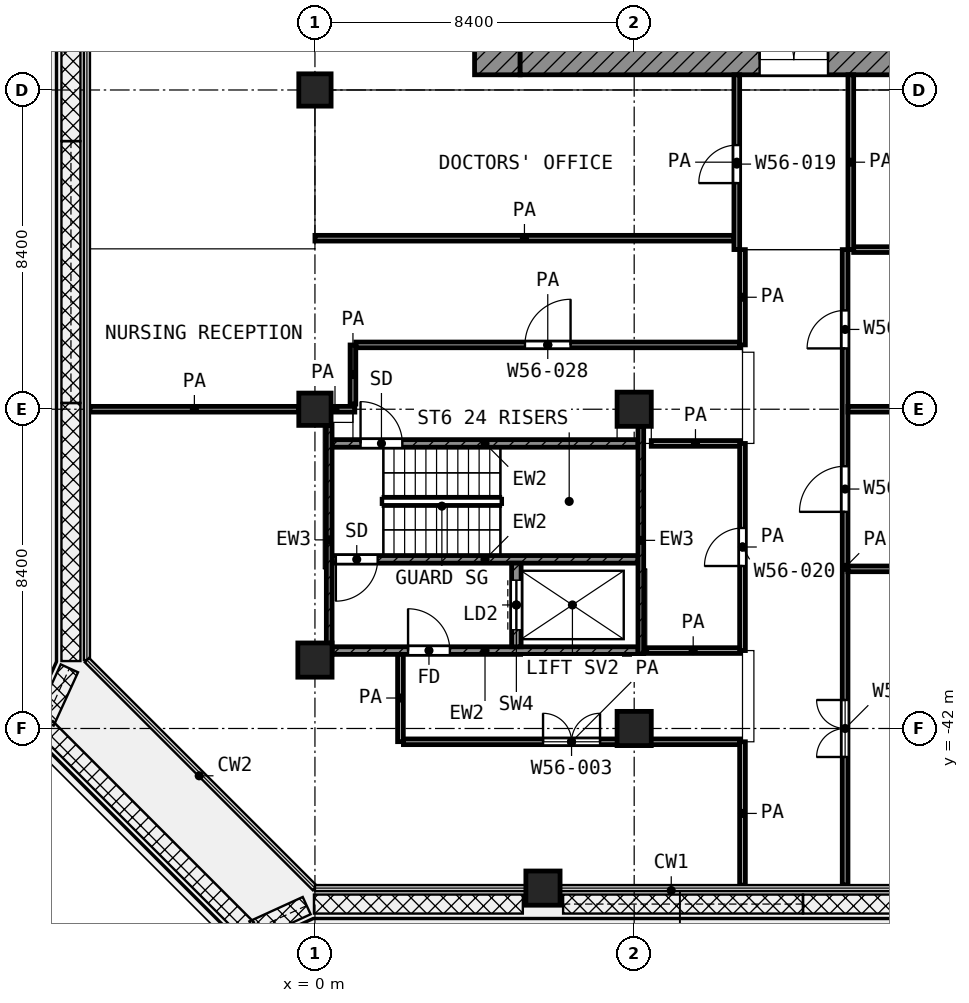
"""IFC4 building model, lengths in metres.
Left out: names, types, materials, properties, quantities, classifications, styles, units other than length and angle.
Written with IfcOpenShell. Run it as: python <this file> out.ifc"""

import sys

from ifc_helpers import new_model, si_unit, direction, frame, frame_2d, origin, origin_2d, place, context, subcontext, project, spatial, rectangle, extrude, element, fill, save


model = new_model("IFC4")
c1 = context("Model", 3, precision=1e-05, world=origin(), true_north=direction((0.0, 1.0)))
c2 = subcontext(c1, "Body", "Model", "MODEL_VIEW")
j1 = project(units=[si_unit("LENGTHUNIT", "METRE"), si_unit("PLANEANGLEUNIT", "RADIAN")], contexts=[c1])
p1 = place(None, origin())
s1 = spatial("IfcSite", under=j1, at=p1, CompositionType="ELEMENT")
p2 = place(p1, origin())
s2 = spatial("IfcBuilding", under=s1, at=p2, CompositionType="ELEMENT")
p3 = place(p2, frame((0.0, 0.0, 243.2)))
s3 = spatial("IfcBuildingStorey", under=s2, at=p3, CompositionType="ELEMENT", Elevation=243.2)
for number, where, z_axis, x_axis in (
    (1, (0.0, -25.2, 0.0), (0.0, 0.0, 1.0), (1.0, 0.0, 0.0)),
    (2, (0.0, -33.6, 0.0), (0.0, 0.0, 1.0), (1.0, 0.0, 0.0)),
):
    element("IfcColumn", number, at=place(p3, frame(where, z_axis=z_axis, x_axis=x_axis)), inside=s3, PredefinedType="COLUMN", context=c2, shape_type="SweptSolid", body=[
        extrude(rectangle(XDim=0.85, YDim=0.85, at=origin_2d()), origin(), (0.0, 0.0, 1.0), 4.2),
    ])
for number, where, z_axis, x_axis in (
    (3, (8.4, -33.6, 0.0), (0.0, 0.0, 1.0), (1.0, 0.0, 0.0)),
    (4, (0.0, -40.2, 0.0), (0.0, 0.0, 1.0), (1.0, 0.0, 0.0)),
    (5, (8.4, -42.0, 0.0), (0.0, 0.0, 1.0), (1.0, 0.0, 0.0)),
    (6, (6.0, -46.2, 0.0), (0.0, 0.0, 1.0), (1.0, 0.0, 0.0)),
):
    element("IfcColumn", number, at=place(p3, frame(where, z_axis=z_axis, x_axis=x_axis)), inside=s3, PredefinedType="COLUMN", context=c2, shape_type="SweptSolid", body=[
        extrude(rectangle(XDim=0.9, YDim=0.9, at=origin_2d()), origin(), (0.0, 0.0, 1.0), 4.2),
    ])
p4 = place(p3, frame((4.8, -24.8, 0.0), z_axis=(0.0, 0.0, 1.0), x_axis=(0.0, 1.0, 0.0)))
e7 = element("IfcWall", 7, at=p4, inside=s3, PredefinedType="SHEAR", context=c2, shape_type="SweptSolid", body=[
    extrude(rectangle(XDim=19.4, YDim=1.2, at=frame_2d((9.7, 0.0))), origin(), (0.0, 0.0, 1.0), 3.6),
])
p5 = place(p4, frame((11.25, 0.0, 0.0)))
e8 = element("IfcOpeningElement", 8, at=p5, cuts=e7, PredefinedType="OPENING", context=c2, shape_type="SweptSolid", body=[
    extrude(rectangle(XDim=1.1, YDim=2.1, at=frame_2d((0.55, 1.05))), frame((0.0, 0.61, 0.0), z_axis=(0.0, -1.0, 0.0), x_axis=(1.0, 0.0, 0.0)), (0.0, 0.0, 1.0), 1.22),
])
p6 = place(p4, frame((1.95, 0.0, 0.0)))
e9 = element("IfcOpeningElement", 9, at=p6, cuts=e7, PredefinedType="OPENING", context=c2, shape_type="SweptSolid", body=[
    extrude(rectangle(XDim=1.1, YDim=2.1, at=frame_2d((0.55, 1.05))), frame((0.0, 0.61, 0.0), z_axis=(0.0, -1.0, 0.0), x_axis=(1.0, 0.0, 0.0)), (0.0, 0.0, 1.0), 1.22),
])
p7 = place(p3, frame((5.4, -24.4, 0.0), z_axis=(0.0, 0.0, 1.0), x_axis=(1.0, 0.0, 0.0)))
e10 = element("IfcWall", 10, at=p7, inside=s3, PredefinedType="SHEAR", context=c2, shape_type="SweptSolid", body=[
    extrude(rectangle(XDim=18.6, YDim=0.8, at=frame_2d((9.3, 0.0))), origin(), (0.0, 0.0, 1.0), 3.6),
])
p8 = place(p7, frame((6.3, 0.0, 0.0)))
e11 = element("IfcOpeningElement", 11, at=p8, cuts=e10, PredefinedType="OPENING", context=c2, shape_type="SweptSolid", body=[
    extrude(rectangle(XDim=1.8, YDim=2.1, at=frame_2d((0.9, 1.05))), frame((0.0, 0.41, 0.0), z_axis=(0.0, -1.0, 0.0), x_axis=(1.0, 0.0, 0.0)), (0.0, 0.0, 1.0), 0.82),
])
p9 = place(p3, frame((0.375, -40.05, 0.0), z_axis=(0.0, 0.0, 1.0), x_axis=(0.0, 1.0, 0.0)))
e12 = element("IfcWall", 12, at=p9, inside=s3, PredefinedType="SHEAR", context=c2, shape_type="SweptSolid", body=[
    extrude(rectangle(XDim=6.025, YDim=0.15, at=frame_2d((3.013, 0.0))), origin(), (0.0, 0.0, 1.0), 3.6),
])
p10 = place(p3, frame((8.575, -40.05, 0.0), z_axis=(0.0, 0.0, 1.0), x_axis=(0.0, 1.0, 0.0)))
e13 = element("IfcWall", 13, at=p10, inside=s3, PredefinedType="SHEAR", context=c2, shape_type="SweptSolid", body=[
    extrude(rectangle(XDim=6.0, YDim=0.15, at=frame_2d((3.0, 0.0))), origin(), (0.0, 0.0, 1.0), 3.6),
])
p11 = place(p3, frame((0.45, -34.5, 0.0), z_axis=(0.0, 0.0, 1.0), x_axis=(1.0, 0.0, 0.0)))
e14 = element("IfcWall", 14, at=p11, inside=s3, PredefinedType="SHEAR", context=c2, shape_type="SweptSolid", body=[
    extrude(rectangle(XDim=8.05, YDim=0.2, at=frame_2d((4.025, 0.0))), origin(), (0.0, 0.0, 1.0), 3.6),
])
p12 = place(p11, frame((0.75, 0.0, 0.0)))
e15 = element("IfcOpeningElement", 15, at=p12, cuts=e14, PredefinedType="OPENING", context=c2, shape_type="SweptSolid", body=[
    extrude(rectangle(XDim=1.1, YDim=2.1, at=frame_2d((0.55, 1.05))), frame((0.0, 0.11, 0.0), z_axis=(0.0, -1.0, 0.0), x_axis=(1.0, 0.0, 0.0)), (0.0, 0.0, 1.0), 0.22),
])
p13 = place(p3, frame((0.45, -37.55, 0.0), z_axis=(0.0, 0.0, 1.0), x_axis=(1.0, 0.0, 0.0)))
e16 = element("IfcWall", 16, at=p13, inside=s3, PredefinedType="SHEAR", context=c2, shape_type="SweptSolid", body=[
    extrude(rectangle(XDim=8.05, YDim=0.2, at=frame_2d((4.025, 0.0))), origin(), (0.0, 0.0, 1.0), 3.6),
])
p14 = place(p13, frame((0.1, 0.0, 0.0)))
e17 = element("IfcOpeningElement", 17, at=p14, cuts=e16, PredefinedType="OPENING", context=c2, shape_type="SweptSolid", body=[
    extrude(rectangle(XDim=1.1, YDim=2.1, at=frame_2d((0.55, 1.05))), frame((0.0, 0.11, 0.0), z_axis=(0.0, -1.0, 0.0), x_axis=(1.0, 0.0, 0.0)), (0.0, 0.0, 1.0), 0.22),
])
p15 = place(p3, frame((0.45, -39.95, 0.0), z_axis=(0.0, 0.0, 1.0), x_axis=(1.0, 0.0, 0.0)))
e18 = element("IfcWall", 18, at=p15, inside=s3, PredefinedType="SHEAR", context=c2, shape_type="SweptSolid", body=[
    extrude(rectangle(XDim=8.05, YDim=0.2, at=frame_2d((4.025, 0.0))), origin(), (0.0, 0.0, 1.0), 3.6),
])
p16 = place(p15, frame((2.0, 0.0, 0.0)))
e19 = element("IfcOpeningElement", 19, at=p16, cuts=e18, PredefinedType="OPENING", context=c2, shape_type="SweptSolid", body=[
    extrude(rectangle(XDim=1.1, YDim=2.1, at=frame_2d((0.55, 1.05))), frame((0.0, 0.11, 0.0), z_axis=(0.0, -1.0, 0.0), x_axis=(1.0, 0.0, 0.0)), (0.0, 0.0, 1.0), 0.22),
])
p17 = place(p3, frame((5.3, -39.85, 0.0), z_axis=(0.0, 0.0, 1.0), x_axis=(0.0, 1.0, 0.0)))
e20 = element("IfcWall", 20, at=p17, inside=s3, PredefinedType="SHEAR", context=c2, shape_type="SweptSolid", body=[
    extrude(rectangle(XDim=2.2, YDim=0.25, at=frame_2d((1.1, 0.0))), origin(), (0.0, 0.0, 1.0), 3.6),
])
p18 = place(p17, frame((0.45, 0.0, 0.0)))
e21 = element("IfcOpeningElement", 21, at=p18, cuts=e20, PredefinedType="OPENING", context=c2, shape_type="SweptSolid", body=[
    extrude(rectangle(XDim=1.3, YDim=2.1, at=frame_2d((0.65, 1.05))), frame((0.0, 0.135, 0.0), z_axis=(0.0, -1.0, 0.0), x_axis=(1.0, 0.0, 0.0)), (0.0, 0.0, 1.0), 0.27),
])
p19 = place(p3, frame((2.328, -42.35, 0.0), z_axis=(0.0, 0.0, 1.0), x_axis=(1.0, 0.0, 0.0)))
e22 = element("IfcWall", 22, at=p19, inside=s3, PredefinedType="PARTITIONING", context=c2, shape_type="SweptSolid", body=[
    extrude(rectangle(XDim=8.847, YDim=0.15, at=frame_2d((4.424, 0.0))), origin(), (0.0, 0.0, 1.0), 3.6),
])
p20 = place(p19, frame((3.674, 0.0, 0.0)))
e23 = element("IfcOpeningElement", 23, at=p20, cuts=e22, PredefinedType="OPENING", context=c2, shape_type="SweptSolid", body=[
    extrude(rectangle(XDim=1.5, YDim=2.1, at=frame_2d((0.75, 1.05))), frame((0.0, 0.085, 0.0), z_axis=(0.0, -1.0, 0.0), x_axis=(1.0, 0.0, 0.0)), (0.0, 0.0, 1.0), 0.17),
])
p21 = place(p3, frame((8.73, -39.95, 0.0), z_axis=(0.0, 0.0, 1.0), x_axis=(1.0, 0.0, 0.0)))
e24 = element("IfcWall", 24, at=p21, inside=s3, PredefinedType="PARTITIONING", context=c2, shape_type="SweptSolid", body=[
    extrude(rectangle(XDim=2.445, YDim=0.15, at=frame_2d((1.223, 0.0))), origin(), (0.0, 0.0, 1.0), 3.6),
])
p22 = place(p3, frame((14.025, -37.8, 0.0), z_axis=(0.0, 0.0, 1.0), x_axis=(1.0, 0.0, 0.0)))
e25 = element("IfcWall", 25, at=p22, inside=s3, PredefinedType="PARTITIONING", context=c2, shape_type="SweptSolid", body=[
    extrude(rectangle(XDim=11.095, YDim=0.15, at=frame_2d((5.548, 0.0))), origin(), (0.0, 0.0, 1.0), 2.7),
])
p23 = place(p3, frame((8.85, -34.5, 0.0), z_axis=(0.0, 0.0, 1.0), x_axis=(1.0, 0.0, 0.0)))
e26 = element("IfcWall", 26, at=p23, inside=s3, PredefinedType="PARTITIONING", context=c2, shape_type="SweptSolid", body=[
    extrude(rectangle(XDim=2.325, YDim=0.15, at=frame_2d((1.163, 0.0))), origin(), (0.0, 0.0, 1.0), 3.6),
])
p24 = place(p3, frame((-5.92, -33.6, 0.0), z_axis=(0.0, 0.0, 1.0), x_axis=(1.0, 0.0, 0.0)))
e27 = element("IfcWall", 27, at=p24, inside=s3, PredefinedType="PARTITIONING", context=c2, shape_type="SweptSolid", body=[
    extrude(rectangle(XDim=5.495, YDim=0.15, at=frame_2d((2.748, 0.0))), origin(), (0.0, 0.0, 1.0), 3.6),
])
p25 = place(p3, frame((0.006, -33.6, 0.0), z_axis=(0.0, 0.0, 1.0), x_axis=(1.0, 0.0, 0.0)))
e28 = element("IfcWall", 28, at=p25, inside=s3, PredefinedType="PARTITIONING", context=c2, shape_type="SweptSolid", body=[
    extrude(rectangle(XDim=1.043, YDim=0.15, at=frame_2d((0.521, 0.0))), origin(), (0.0, 0.0, 1.0), 3.6),
])
p26 = place(p3, frame((14.025, -33.6, 0.0), z_axis=(0.0, 0.0, 1.0), x_axis=(1.0, 0.0, 0.0)))
e29 = element("IfcWall", 29, at=p26, inside=s3, PredefinedType="PARTITIONING", context=c2, shape_type="SweptSolid", body=[
    extrude(rectangle(XDim=11.095, YDim=0.15, at=frame_2d((5.548, 0.0))), origin(), (0.0, 0.0, 1.0), 2.7),
])
p27 = place(p3, frame((1.077, -31.907, 0.0), z_axis=(0.0, 0.0, 1.0), x_axis=(1.0, 0.0, 0.0)))
e30 = element("IfcWall", 30, at=p27, inside=s3, PredefinedType="PARTITIONING", context=c2, shape_type="SweptSolid", body=[
    extrude(rectangle(XDim=10.098, YDim=0.15, at=frame_2d((5.049, 0.0))), origin(), (0.0, 0.0, 1.0), 3.6),
])
p28 = place(p27, frame((4.449, 0.0, 0.0)))
e31 = element("IfcOpeningElement", 31, at=p28, cuts=e30, PredefinedType="OPENING", context=c2, shape_type="SweptSolid", body=[
    extrude(rectangle(XDim=1.2, YDim=2.1, at=frame_2d((0.6, 1.05))), frame((0.0, 0.085, 0.0), z_axis=(0.0, -1.0, 0.0), x_axis=(1.0, 0.0, 0.0)), (0.0, 0.0, 1.0), 0.17),
])
p29 = place(p3, frame((14.175, -29.4, 0.0), z_axis=(0.0, 0.0, 1.0), x_axis=(1.0, 0.0, 0.0)))
e32 = element("IfcWall", 32, at=p29, inside=s3, PredefinedType="PARTITIONING", context=c2, shape_type="SweptSolid", body=[
    extrude(rectangle(XDim=10.95, YDim=0.15, at=frame_2d((5.475, 0.0))), origin(), (0.0, 0.0, 1.0), 3.6),
])
p30 = place(p3, frame((0.0, -29.1, 0.0), z_axis=(0.0, 0.0, 1.0), x_axis=(1.0, 0.0, 0.0)))
e33 = element("IfcWall", 33, at=p30, inside=s3, PredefinedType="PARTITIONING", context=c2, shape_type="SweptSolid", body=[
    extrude(rectangle(XDim=11.025, YDim=0.15, at=frame_2d((5.512, 0.0))), origin(), (0.0, 0.0, 1.0), 3.6),
])
p31 = place(p3, frame((1.0, -33.465, 0.0), z_axis=(0.0, 0.0, 1.0), x_axis=(0.0, 1.0, 0.0)))
e34 = element("IfcWall", 34, at=p31, inside=s3, PredefinedType="PARTITIONING", context=c2, shape_type="SweptSolid", body=[
    extrude(rectangle(XDim=1.556, YDim=0.15, at=frame_2d((0.778, 0.0))), origin(), (0.0, 0.0, 1.0), 3.6),
])
p32 = place(p3, frame((2.25, -42.347, 0.0), z_axis=(0.0, 0.0, 1.0), x_axis=(0.0, 1.0, 0.0)))
e35 = element("IfcWall", 35, at=p32, inside=s3, PredefinedType="PARTITIONING", context=c2, shape_type="SweptSolid", body=[
    extrude(rectangle(XDim=2.297, YDim=0.15, at=frame_2d((1.148, 0.0))), origin(), (0.0, 0.0, 1.0), 3.6),
])
p33 = place(p3, frame((11.1, -29.399, 0.0), z_axis=(0.0, 0.0, 1.0), x_axis=(0.0, 1.0, 0.0)))
e36 = element("IfcWall", 36, at=p33, inside=s3, PredefinedType="PARTITIONING", context=c2, shape_type="SweptSolid", body=[
    extrude(rectangle(XDim=4.599, YDim=0.15, at=frame_2d((2.299, 0.0))), origin(), (0.0, 0.0, 1.0), 3.6),
])
p34 = place(p33, frame((1.749, 0.0, 0.0)))
e37 = element("IfcOpeningElement", 37, at=p34, cuts=e36, PredefinedType="OPENING", context=c2, shape_type="SweptSolid", body=[
    extrude(rectangle(XDim=1.0, YDim=2.1, at=frame_2d((0.5, 1.05))), frame((0.0, 0.085, 0.0), z_axis=(0.0, -1.0, 0.0), x_axis=(1.0, 0.0, 0.0)), (0.0, 0.0, 1.0), 0.17),
])
p35 = place(p3, frame((11.25, -46.12, 0.0), z_axis=(0.0, 0.0, 1.0), x_axis=(0.0, 1.0, 0.0)))
e38 = element("IfcWall", 38, at=p35, inside=s3, PredefinedType="PARTITIONING", context=c2, shape_type="SweptSolid", body=[
    extrude(rectangle(XDim=3.77, YDim=0.15, at=frame_2d((1.885, 0.0))), origin(), (0.0, 0.0, 1.0), 3.6),
])
p36 = place(p3, frame((11.25, -39.95, 0.0), z_axis=(0.0, 0.0, 1.0), x_axis=(0.0, 1.0, 0.0)))
e39 = element("IfcWall", 39, at=p36, inside=s3, PredefinedType="PARTITIONING", context=c2, shape_type="SweptSolid", body=[
    extrude(rectangle(XDim=5.45, YDim=0.15, at=frame_2d((2.725, 0.0))), origin(), (0.0, 0.0, 1.0), 3.6),
])
p37 = place(p36, frame((2.225, 0.0, 0.0)))
e40 = element("IfcOpeningElement", 40, at=p37, cuts=e39, PredefinedType="OPENING", context=c2, shape_type="SweptSolid", body=[
    extrude(rectangle(XDim=1.0, YDim=2.1, at=frame_2d((0.5, 1.05))), frame((0.0, 0.085, 0.0), z_axis=(0.0, -1.0, 0.0), x_axis=(1.0, 0.0, 0.0)), (0.0, 0.0, 1.0), 0.17),
])
p38 = place(p3, frame((11.25, -31.907, 0.0), z_axis=(0.0, 0.0, 1.0), x_axis=(0.0, 1.0, 0.0)))
e41 = element("IfcWall", 41, at=p38, inside=s3, PredefinedType="PARTITIONING", context=c2, shape_type="SweptSolid", body=[
    extrude(rectangle(XDim=2.507, YDim=0.15, at=frame_2d((1.253, 0.0))), origin(), (0.0, 0.0, 1.0), 3.6),
])
p39 = place(p3, frame((13.95, -46.12, 0.0), z_axis=(0.0, 0.0, 1.0), x_axis=(0.0, 1.0, 0.0)))
e42 = element("IfcWall", 42, at=p39, inside=s3, PredefinedType="PARTITIONING", context=c2, shape_type="SweptSolid", body=[
    extrude(rectangle(XDim=16.72, YDim=0.15, at=frame_2d((8.36, 0.0))), origin(), (0.0, 0.0, 1.0), 3.6),
])
p40 = place(p39, frame((14.12, 0.0, 0.0)))
e43 = element("IfcOpeningElement", 43, at=p40, cuts=e42, PredefinedType="OPENING", context=c2, shape_type="SweptSolid", body=[
    extrude(rectangle(XDim=1.0, YDim=2.1, at=frame_2d((0.5, 1.05))), frame((0.0, 0.085, 0.0), z_axis=(0.0, -1.0, 0.0), x_axis=(1.0, 0.0, 0.0)), (0.0, 0.0, 1.0), 0.17),
])
p41 = place(p39, frame((9.82, 0.0, 0.0)))
e44 = element("IfcOpeningElement", 44, at=p41, cuts=e42, PredefinedType="OPENING", context=c2, shape_type="SweptSolid", body=[
    extrude(rectangle(XDim=1.2, YDim=2.1, at=frame_2d((0.6, 1.05))), frame((0.0, 0.085, 0.0), z_axis=(0.0, -1.0, 0.0), x_axis=(1.0, 0.0, 0.0)), (0.0, 0.0, 1.0), 0.17),
])
p42 = place(p39, frame((3.37, 0.0, 0.0)))
e45 = element("IfcOpeningElement", 45, at=p42, cuts=e42, PredefinedType="OPENING", context=c2, shape_type="SweptSolid", body=[
    extrude(rectangle(XDim=1.5, YDim=2.1, at=frame_2d((0.75, 1.05))), frame((0.0, 0.085, 0.0), z_axis=(0.0, -1.0, 0.0), x_axis=(1.0, 0.0, 0.0)), (0.0, 0.0, 1.0), 0.17),
])
p43 = place(p3, frame((14.1, -29.4, 0.0), z_axis=(0.0, 0.0, 1.0), x_axis=(0.0, 1.0, 0.0)))
e46 = element("IfcWall", 46, at=p43, inside=s3, PredefinedType="PARTITIONING", context=c2, shape_type="SweptSolid", body=[
    extrude(rectangle(XDim=4.6, YDim=0.15, at=frame_2d((2.3, 0.0))), origin(), (0.0, 0.0, 1.0), 3.6),
])
p44 = place(p8, origin())
e47 = element("IfcDoor", 47, at=p44, inside=s3, OperationType="DOUBLE_DOOR_SINGLE_SWING", PredefinedType="DOOR", context=c2, shape_type="SweptSolid", body=[
    extrude(rectangle(XDim=1.8, YDim=2.1, at=frame_2d((0.9, 1.05))), frame((0.0, 0.025, 0.0), z_axis=(0.0, -1.0, 0.0), x_axis=(1.0, 0.0, 0.0)), (0.0, 0.0, 1.0), 0.05),
])
fill(e11, e47)
p45 = place(p12, origin())
e48 = element("IfcDoor", 48, at=p45, inside=s3, OperationType="SINGLE_SWING_LEFT", PredefinedType="DOOR", context=c2, shape_type="SweptSolid", body=[
    extrude(rectangle(XDim=1.1, YDim=2.1, at=frame_2d((0.55, 1.05))), frame((0.0, 0.025, 0.0), z_axis=(0.0, -1.0, 0.0), x_axis=(1.0, 0.0, 0.0)), (0.0, 0.0, 1.0), 0.05),
])
fill(e15, e48)
p46 = place(p14, frame((1.1, 0.0, 0.0), z_axis=(0.0, 0.0, 1.0), x_axis=(-1.0, 0.0, 0.0)))
e49 = element("IfcDoor", 49, at=p46, inside=s3, OperationType="SINGLE_SWING_LEFT", PredefinedType="DOOR", context=c2, shape_type="SweptSolid", body=[
    extrude(rectangle(XDim=1.1, YDim=2.1, at=frame_2d((0.55, 1.05))), frame((0.0, 0.025, 0.0), z_axis=(0.0, -1.0, 0.0), x_axis=(1.0, 0.0, 0.0)), (0.0, 0.0, 1.0), 0.05),
])
fill(e17, e49)
p47 = place(p18, origin())
e50 = element("IfcDoor", 50, at=p47, inside=s3, OperationType="DOUBLE_DOOR_SLIDING", PredefinedType="DOOR", context=c2, shape_type="SweptSolid", body=[
    extrude(rectangle(XDim=1.3, YDim=2.1, at=frame_2d((0.65, 1.05))), frame((0.0, 0.025, 0.0), z_axis=(0.0, -1.0, 0.0), x_axis=(1.0, 0.0, 0.0)), (0.0, 0.0, 1.0), 0.05),
])
fill(e21, e50)
p48 = place(p16, origin())
e51 = element("IfcDoor", 51, at=p48, inside=s3, OperationType="SINGLE_SWING_LEFT", PredefinedType="DOOR", context=c2, shape_type="SweptSolid", body=[
    extrude(rectangle(XDim=1.1, YDim=2.1, at=frame_2d((0.55, 1.05))), frame((0.0, 0.025, 0.0), z_axis=(0.0, -1.0, 0.0), x_axis=(1.0, 0.0, 0.0)), (0.0, 0.0, 1.0), 0.05),
])
fill(e19, e51)
p49 = place(p34, origin())
e52 = element("IfcDoor", 52, at=p49, inside=s3, OperationType="SINGLE_SWING_LEFT", PredefinedType="DOOR", context=c2, shape_type="SweptSolid", body=[
    extrude(rectangle(XDim=1.0, YDim=2.1, at=frame_2d((0.5, 1.05))), frame((0.0, 0.025, 0.0), z_axis=(0.0, -1.0, 0.0), x_axis=(1.0, 0.0, 0.0)), (0.0, 0.0, 1.0), 0.05),
])
fill(e37, e52)
p50 = place(p28, origin())
e53 = element("IfcDoor", 53, at=p50, inside=s3, OperationType="SINGLE_SWING_RIGHT", PredefinedType="DOOR", context=c2, shape_type="SweptSolid", body=[
    extrude(rectangle(XDim=1.2, YDim=2.1, at=frame_2d((0.6, 1.05))), frame((0.0, 0.025, 0.0), z_axis=(0.0, -1.0, 0.0), x_axis=(1.0, 0.0, 0.0)), (0.0, 0.0, 1.0), 0.05),
])
fill(e31, e53)
p51 = place(p37, origin())
e54 = element("IfcDoor", 54, at=p51, inside=s3, OperationType="SINGLE_SWING_LEFT", PredefinedType="DOOR", context=c2, shape_type="SweptSolid", body=[
    extrude(rectangle(XDim=1.0, YDim=2.1, at=frame_2d((0.5, 1.05))), frame((0.0, 0.025, 0.0), z_axis=(0.0, -1.0, 0.0), x_axis=(1.0, 0.0, 0.0)), (0.0, 0.0, 1.0), 0.05),
])
fill(e40, e54)
p52 = place(p20, origin())
e55 = element("IfcDoor", 55, at=p52, inside=s3, OperationType="DOUBLE_DOOR_SINGLE_SWING", PredefinedType="DOOR", context=c2, shape_type="SweptSolid", body=[
    extrude(rectangle(XDim=1.5, YDim=2.1, at=frame_2d((0.75, 1.05))), frame((0.0, 0.025, 0.0), z_axis=(0.0, -1.0, 0.0), x_axis=(1.0, 0.0, 0.0)), (0.0, 0.0, 1.0), 0.05),
])
fill(e23, e55)
p53 = place(p40, origin())
e56 = element("IfcDoor", 56, at=p53, inside=s3, OperationType="SINGLE_SWING_LEFT", PredefinedType="DOOR", context=c2, shape_type="SweptSolid", body=[
    extrude(rectangle(XDim=1.0, YDim=2.1, at=frame_2d((0.5, 1.05))), frame((0.0, 0.025, 0.0), z_axis=(0.0, -1.0, 0.0), x_axis=(1.0, 0.0, 0.0)), (0.0, 0.0, 1.0), 0.05),
])
fill(e43, e56)
p54 = place(p41, origin())
e57 = element("IfcDoor", 57, at=p54, inside=s3, OperationType="SINGLE_SWING_LEFT", PredefinedType="DOOR", context=c2, shape_type="SweptSolid", body=[
    extrude(rectangle(XDim=1.2, YDim=2.1, at=frame_2d((0.6, 1.05))), frame((0.0, 0.025, 0.0), z_axis=(0.0, -1.0, 0.0), x_axis=(1.0, 0.0, 0.0)), (0.0, 0.0, 1.0), 0.05),
])
fill(e44, e57)
p55 = place(p42, origin())
e58 = element("IfcDoor", 58, at=p55, inside=s3, OperationType="DOUBLE_DOOR_SINGLE_SWING", PredefinedType="DOOR", context=c2, shape_type="SweptSolid", body=[
    extrude(rectangle(XDim=1.5, YDim=2.1, at=frame_2d((0.75, 1.05))), frame((0.0, 0.025, 0.0), z_axis=(0.0, -1.0, 0.0), x_axis=(1.0, 0.0, 0.0)), (0.0, 0.0, 1.0), 0.05),
])
fill(e45, e58)
save(model, sys.argv[1])
